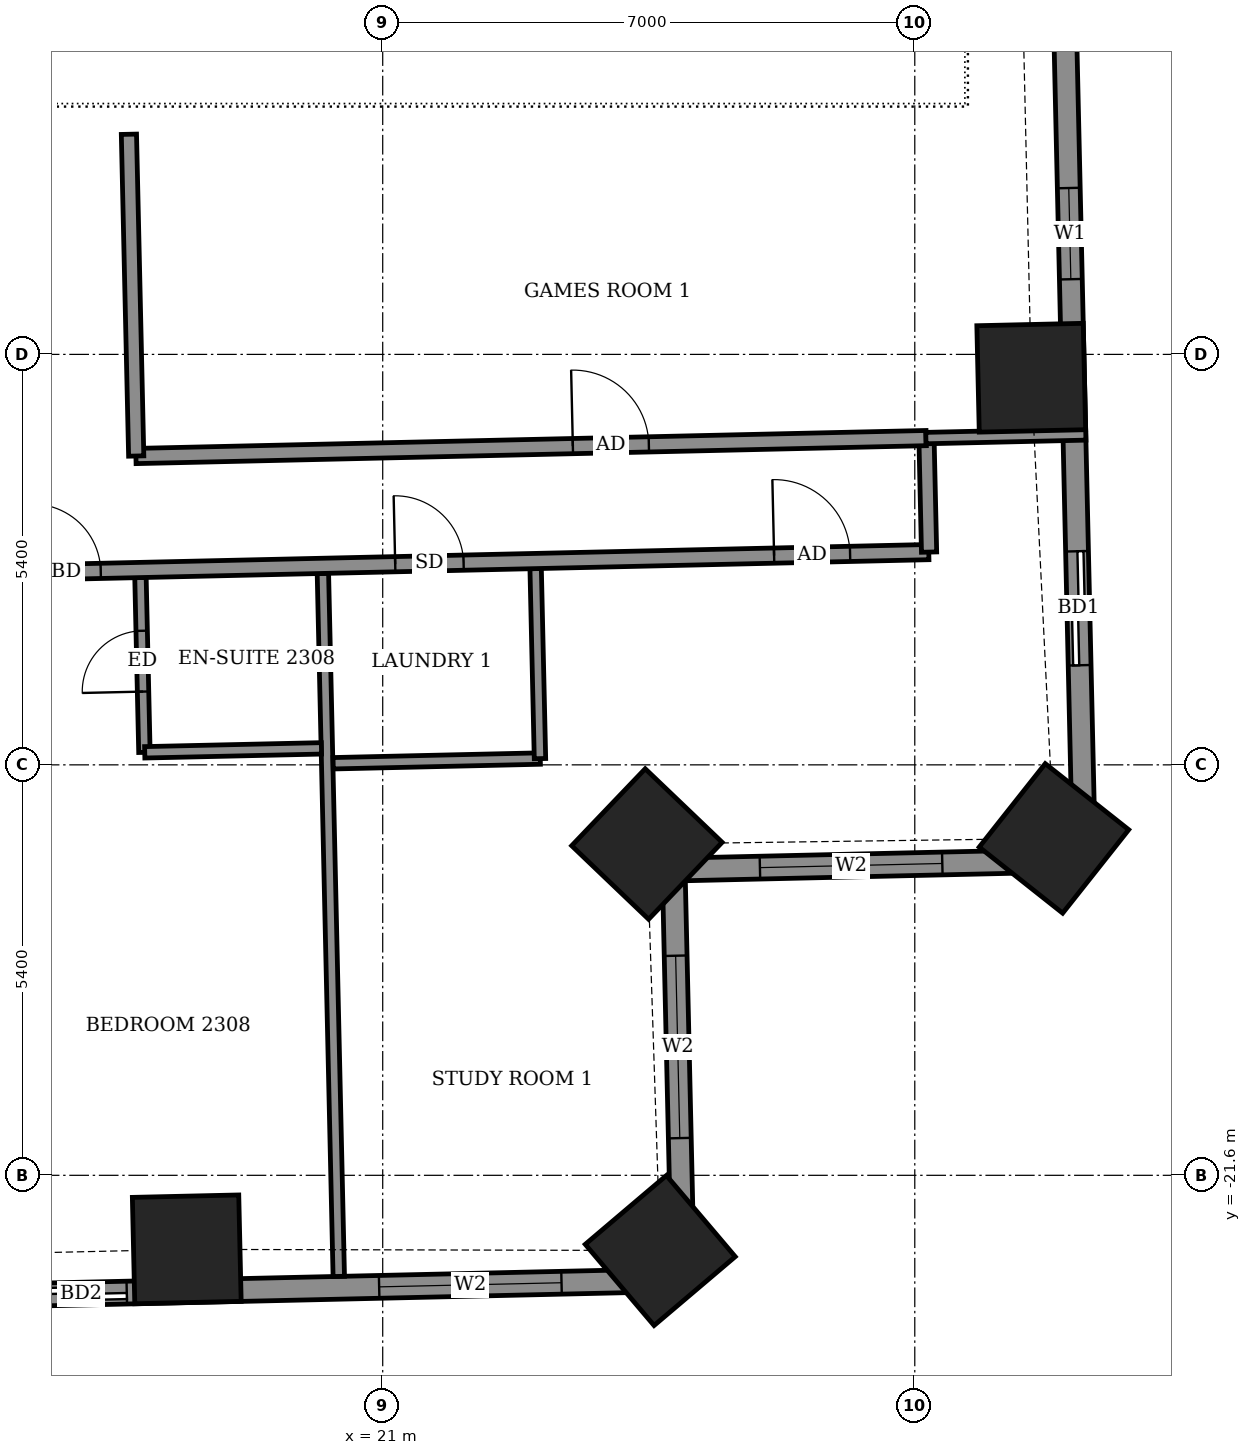
"""IFC4 building model, lengths in metres.
Left out: names, types, materials, properties, quantities, classifications, styles, units other than length and angle.
Written with IfcOpenShell. Run it as: python <this file> out.ifc"""

import sys

from ifc_helpers import new_model, si_unit, direction, frame, frame_2d, origin, origin_2d, place, context, subcontext, project, spatial, rectangle, extrude, element, fill, save


model = new_model("IFC4")
c1 = context("Model", 3, precision=1e-05, world=origin(), true_north=direction((0.0, 1.0)))
c2 = subcontext(c1, "Body", "Model", "MODEL_VIEW")
j1 = project(units=[si_unit("LENGTHUNIT", "METRE"), si_unit("PLANEANGLEUNIT", "RADIAN")], contexts=[c1])
p1 = place(None, origin())
s1 = spatial("IfcSite", under=j1, at=p1, CompositionType="ELEMENT")
p2 = place(p1, origin())
s2 = spatial("IfcBuilding", under=s1, at=p2, CompositionType="ELEMENT")
p3 = place(p2, frame((0.0, 0.0, 93.7)))
s3 = spatial("IfcBuildingStorey", under=s2, at=p3, CompositionType="ELEMENT", Elevation=93.7)
for number, where, z_axis, x_axis in (
    (1, (18.422, -22.574, -0.55), (0.0, 0.0, 1.0), (1.0, 0.023, 0.0)),
    (2, (24.651, -22.589, -0.55), (0.0, 0.0, 1.0), (0.763, 0.647, 0.0)),
    (3, (24.476, -17.241, -0.55), (0.0, 0.0, 1.0), (0.691, 0.723, 0.0)),
    (4, (29.831, -17.168, -0.55), (0.0, 0.0, 1.0), (0.621, 0.784, 0.0)),
    (5, (29.532, -11.107, -0.55), (0.0, 0.0, 1.0), (-0.023, 1.0, 0.0)),
):
    element("IfcColumn", number, at=place(p3, frame(where, z_axis=z_axis, x_axis=x_axis)), inside=s3, PredefinedType="COLUMN", context=c2, shape_type="SweptSolid", body=[
        extrude(rectangle(XDim=1.4, YDim=1.4, at=origin_2d()), origin(), (0.0, 0.0, 1.0), 3.6),
    ])
p4 = place(p3, frame((30.227, -17.455, 0.0), z_axis=(0.0, 0.0, 1.0), x_axis=(-0.022734702163, 0.999741533256, 0.0)))
e6 = element("IfcWall", 6, at=p4, inside=s3, PredefinedType="SOLIDWALL", context=c2, shape_type="SweptSolid", body=[
    extrude(rectangle(XDim=12.929, YDim=0.3, at=frame_2d((6.465, 0.0))), origin(), (0.0, 0.0, 1.0), 3.05),
])
p5 = place(p4, frame((2.566, 0.0, 0.0)))
e7 = element("IfcOpeningElement", 7, at=p5, cuts=e6, PredefinedType="OPENING", context=c2, shape_type="SweptSolid", body=[
    extrude(rectangle(XDim=1.5, YDim=2.4, at=frame_2d((0.75, 1.2))), frame((0.0, 0.16, 0.0), z_axis=(0.0, -1.0, 0.0), x_axis=(1.0, 0.0, 0.0)), (0.0, 0.0, 1.0), 0.32),
])
p6 = place(p4, frame((7.646, 0.0, 0.9)))
e8 = element("IfcOpeningElement", 8, at=p6, cuts=e6, PredefinedType="OPENING", context=c2, shape_type="SweptSolid", body=[
    extrude(rectangle(XDim=1.2, YDim=1.5, at=frame_2d((0.6, 0.75))), frame((0.0, 0.16, 0.0), z_axis=(0.0, -1.0, 0.0), x_axis=(1.0, 0.0, 0.0)), (0.0, 0.0, 1.0), 0.32),
])
p7 = place(p3, frame((-21.409, -24.029, 0.0), z_axis=(0.0, 0.0, 1.0), x_axis=(0.999742634032, 0.022686244721, 0.0)))
e9 = element("IfcWall", 9, at=p7, inside=s3, PredefinedType="SOLIDWALL", context=c2, shape_type="SweptSolid", body=[
    extrude(rectangle(XDim=46.372, YDim=0.3, at=frame_2d((23.186, 0.0))), origin(), (0.0, 0.0, 1.0), 3.05),
])
p8 = place(p7, frame((2.686, 0.0, 0.0)))
e10 = element("IfcOpeningElement", 10, at=p8, cuts=e9, PredefinedType="OPENING", context=c2, shape_type="SweptSolid", body=[
    extrude(rectangle(XDim=1.5, YDim=2.4, at=frame_2d((0.75, 1.2))), frame((0.0, 0.16, 0.0), z_axis=(0.0, -1.0, 0.0), x_axis=(1.0, 0.0, 0.0)), (0.0, 0.0, 1.0), 0.32),
])
p9 = place(p7, frame((7.959, 0.0, 0.0)))
e11 = element("IfcOpeningElement", 11, at=p9, cuts=e9, PredefinedType="OPENING", context=c2, shape_type="SweptSolid", body=[
    extrude(rectangle(XDim=1.5, YDim=2.4, at=frame_2d((0.75, 1.2))), frame((0.0, 0.16, 0.0), z_axis=(0.0, -1.0, 0.0), x_axis=(1.0, 0.0, 0.0)), (0.0, 0.0, 1.0), 0.32),
])
p10 = place(p7, frame((10.842, 0.0, 0.0)))
e12 = element("IfcOpeningElement", 12, at=p10, cuts=e9, PredefinedType="OPENING", context=c2, shape_type="SweptSolid", body=[
    extrude(rectangle(XDim=1.5, YDim=2.4, at=frame_2d((0.75, 1.2))), frame((0.0, 0.16, 0.0), z_axis=(0.0, -1.0, 0.0), x_axis=(1.0, 0.0, 0.0)), (0.0, 0.0, 1.0), 0.32),
])
p11 = place(p7, frame((16.3, 0.0, 0.0)))
e13 = element("IfcOpeningElement", 13, at=p11, cuts=e9, PredefinedType="OPENING", context=c2, shape_type="SweptSolid", body=[
    extrude(rectangle(XDim=1.5, YDim=2.4, at=frame_2d((0.75, 1.2))), frame((0.0, 0.16, 0.0), z_axis=(0.0, -1.0, 0.0), x_axis=(1.0, 0.0, 0.0)), (0.0, 0.0, 1.0), 0.32),
])
p12 = place(p7, frame((21.326, 0.0, 0.0)))
e14 = element("IfcOpeningElement", 14, at=p12, cuts=e9, PredefinedType="OPENING", context=c2, shape_type="SweptSolid", body=[
    extrude(rectangle(XDim=1.5, YDim=2.4, at=frame_2d((0.75, 1.2))), frame((0.0, 0.16, 0.0), z_axis=(0.0, -1.0, 0.0), x_axis=(1.0, 0.0, 0.0)), (0.0, 0.0, 1.0), 0.32),
])
p13 = place(p7, frame((24.21, 0.0, 0.0)))
e15 = element("IfcOpeningElement", 15, at=p13, cuts=e9, PredefinedType="OPENING", context=c2, shape_type="SweptSolid", body=[
    extrude(rectangle(XDim=1.5, YDim=2.4, at=frame_2d((0.75, 1.2))), frame((0.0, 0.16, 0.0), z_axis=(0.0, -1.0, 0.0), x_axis=(1.0, 0.0, 0.0)), (0.0, 0.0, 1.0), 0.32),
])
p14 = place(p7, frame((29.769, 0.0, 0.0)))
e16 = element("IfcOpeningElement", 16, at=p14, cuts=e9, PredefinedType="OPENING", context=c2, shape_type="SweptSolid", body=[
    extrude(rectangle(XDim=1.5, YDim=2.4, at=frame_2d((0.75, 1.2))), frame((0.0, 0.16, 0.0), z_axis=(0.0, -1.0, 0.0), x_axis=(1.0, 0.0, 0.0)), (0.0, 0.0, 1.0), 0.32),
])
p15 = place(p7, frame((34.819, 0.0, 0.0)))
e17 = element("IfcOpeningElement", 17, at=p15, cuts=e9, PredefinedType="OPENING", context=c2, shape_type="SweptSolid", body=[
    extrude(rectangle(XDim=1.5, YDim=2.4, at=frame_2d((0.75, 1.2))), frame((0.0, 0.16, 0.0), z_axis=(0.0, -1.0, 0.0), x_axis=(1.0, 0.0, 0.0)), (0.0, 0.0, 1.0), 0.32),
])
p16 = place(p7, frame((37.852, 0.0, 0.0)))
e18 = element("IfcOpeningElement", 18, at=p16, cuts=e9, PredefinedType="OPENING", context=c2, shape_type="SweptSolid", body=[
    extrude(rectangle(XDim=1.2, YDim=2.4, at=frame_2d((0.6, 1.2))), frame((0.0, 0.16, 0.0), z_axis=(0.0, -1.0, 0.0), x_axis=(1.0, 0.0, 0.0)), (0.0, 0.0, 1.0), 0.32),
])
p17 = place(p7, frame((42.373, 0.0, 0.9)))
e19 = element("IfcOpeningElement", 19, at=p17, cuts=e9, PredefinedType="OPENING", context=c2, shape_type="SweptSolid", body=[
    extrude(rectangle(XDim=2.4, YDim=1.5, at=frame_2d((1.2, 0.75))), frame((0.0, 0.16, 0.0), z_axis=(0.0, -1.0, 0.0), x_axis=(1.0, 0.0, 0.0)), (0.0, 0.0, 1.0), 0.32),
])
p18 = place(p3, frame((24.951, -22.977, 0.0), z_axis=(0.0, 0.0, 1.0), x_axis=(-0.022784045517, 0.999740409941, 0.0)))
e20 = element("IfcWall", 20, at=p18, inside=s3, PredefinedType="SOLIDWALL", context=c2, shape_type="SweptSolid", body=[
    extrude(rectangle(XDim=5.401, YDim=0.3, at=frame_2d((2.7, 0.0))), origin(), (0.0, 0.0, 1.0), 2.55),
])
p19 = place(p18, frame((1.867, 0.0, 0.9)))
e21 = element("IfcOpeningElement", 21, at=p19, cuts=e20, PredefinedType="OPENING", context=c2, shape_type="SweptSolid", body=[
    extrude(rectangle(XDim=2.4, YDim=1.5, at=frame_2d((1.2, 0.75))), frame((0.0, 0.16, 0.0), z_axis=(0.0, -1.0, 0.0), x_axis=(1.0, 0.0, 0.0)), (0.0, 0.0, 1.0), 0.32),
])
p20 = place(p3, frame((24.828, -17.578, 0.0), z_axis=(0.0, 0.0, 1.0), x_axis=(0.99974143864, 0.022738862475, 0.0)))
e22 = element("IfcWall", 22, at=p20, inside=s3, PredefinedType="SOLIDWALL", context=c2, shape_type="SweptSolid", body=[
    extrude(rectangle(XDim=5.401, YDim=0.3, at=frame_2d((2.7, 0.0))), origin(), (0.0, 0.0, 1.0), 2.55),
])
p21 = place(p20, frame((1.135, 0.0, 0.9)))
e23 = element("IfcOpeningElement", 23, at=p21, cuts=e22, PredefinedType="OPENING", context=c2, shape_type="SweptSolid", body=[
    extrude(rectangle(XDim=2.4, YDim=1.5, at=frame_2d((1.2, 0.75))), frame((0.0, 0.16, 0.0), z_axis=(0.0, -1.0, 0.0), x_axis=(1.0, 0.0, 0.0)), (0.0, 0.0, 1.0), 0.32),
])
p22 = place(p3, frame((20.422, -22.93, 0.0), z_axis=(0.0, 0.0, 1.0), x_axis=(-0.022618288198, 0.999744173796, 0.0)))
e24 = element("IfcWall", 24, at=p22, inside=s3, PredefinedType="PARTITIONING", context=c2, shape_type="SweptSolid", body=[
    extrude(rectangle(XDim=9.25, YDim=0.15, at=frame_2d((4.625, 0.0))), origin(), (0.0, 0.0, 1.0), 2.55),
])
p23 = place(p3, frame((20.348, -16.179, 0.0), z_axis=(0.0, 0.0, 1.0), x_axis=(0.999741187782, 0.022749889061, 0.0)))
e25 = element("IfcWall", 25, at=p23, inside=s3, PredefinedType="PARTITIONING", context=c2, shape_type="SweptSolid", body=[
    extrude(rectangle(XDim=2.726, YDim=0.15, at=frame_2d((1.363, 0.0))), origin(), (0.0, 0.0, 1.0), 3.05),
])
p24 = place(p3, frame((23.069, -16.118, 0.0), z_axis=(0.0, 0.0, 1.0), x_axis=(-0.022845598362, 0.999739005259, 0.0)))
e26 = element("IfcWall", 26, at=p24, inside=s3, PredefinedType="PARTITIONING", context=c2, shape_type="SweptSolid", body=[
    extrude(rectangle(XDim=2.501, YDim=0.15, at=frame_2d((1.25, 0.0))), origin(), (0.0, 0.0, 1.0), 3.05),
])
p25 = place(p3, frame((17.865, -16.036, 0.0), z_axis=(0.0, 0.0, 1.0), x_axis=(-0.022605686808, 0.999744458811, 0.0)))
e27 = element("IfcWall", 27, at=p25, inside=s3, PredefinedType="PARTITIONING", context=c2, shape_type="SweptSolid", body=[
    extrude(rectangle(XDim=2.3, YDim=0.15, at=frame_2d((1.15, 0.0))), origin(), (0.0, 0.0, 1.0), 3.05),
])
p26 = place(p25, frame((0.8, 0.0, 0.0)))
e28 = element("IfcOpeningElement", 28, at=p26, cuts=e27, PredefinedType="OPENING", context=c2, shape_type="SweptSolid", body=[
    extrude(rectangle(XDim=0.8, YDim=2.1, at=frame_2d((0.4, 1.05))), frame((0.0, 0.085, 0.0), z_axis=(0.0, -1.0, 0.0), x_axis=(1.0, 0.0, 0.0)), (0.0, 0.0, 1.0), 0.17),
])
p27 = place(p3, frame((17.869, -16.035, 0.0), z_axis=(0.0, 0.0, 1.0), x_axis=(0.999750007167, 0.022358961731, 0.0)))
e29 = element("IfcWall", 29, at=p27, inside=s3, PredefinedType="PARTITIONING", context=c2, shape_type="SweptSolid", body=[
    extrude(rectangle(XDim=2.326, YDim=0.15, at=frame_2d((1.163, 0.0))), origin(), (0.0, 0.0, 1.0), 3.05),
])
p28 = place(p3, frame((-24.274, -14.591, 0.0), z_axis=(0.0, 0.0, 1.0), x_axis=(0.999742718753, 0.022682510909, 0.0)))
e30 = element("IfcWall", 30, at=p28, inside=s3, PredefinedType="PARTITIONING", context=c2, shape_type="SweptSolid", body=[
    extrude(rectangle(XDim=52.471, YDim=0.2, at=frame_2d((26.236, 0.0))), origin(), (0.0, 0.0, 1.0), 3.05),
])
p29 = place(p28, frame((1.525, 0.0, 0.0)))
e31 = element("IfcOpeningElement", 31, at=p29, cuts=e30, PredefinedType="OPENING", context=c2, shape_type="SweptSolid", body=[
    extrude(rectangle(XDim=1.0, YDim=2.1, at=frame_2d((0.5, 1.05))), frame((0.0, 0.11, 0.0), z_axis=(0.0, -1.0, 0.0), x_axis=(1.0, 0.0, 0.0)), (0.0, 0.0, 1.0), 0.22),
])
p30 = place(p28, frame((6.9, 0.0, 0.0)))
e32 = element("IfcOpeningElement", 32, at=p30, cuts=e30, PredefinedType="OPENING", context=c2, shape_type="SweptSolid", body=[
    extrude(rectangle(XDim=0.9, YDim=2.1, at=frame_2d((0.45, 1.05))), frame((0.0, 0.11, 0.0), z_axis=(0.0, -1.0, 0.0), x_axis=(1.0, 0.0, 0.0)), (0.0, 0.0, 1.0), 0.22),
])
p31 = place(p28, frame((11.575, 0.0, 0.0)))
e33 = element("IfcOpeningElement", 33, at=p31, cuts=e30, PredefinedType="OPENING", context=c2, shape_type="SweptSolid", body=[
    extrude(rectangle(XDim=0.9, YDim=2.1, at=frame_2d((0.45, 1.05))), frame((0.0, 0.11, 0.0), z_axis=(0.0, -1.0, 0.0), x_axis=(1.0, 0.0, 0.0)), (0.0, 0.0, 1.0), 0.22),
])
p32 = place(p28, frame((13.6, 0.0, 0.0)))
e34 = element("IfcOpeningElement", 34, at=p32, cuts=e30, PredefinedType="OPENING", context=c2, shape_type="SweptSolid", body=[
    extrude(rectangle(XDim=0.9, YDim=2.1, at=frame_2d((0.45, 1.05))), frame((0.0, 0.11, 0.0), z_axis=(0.0, -1.0, 0.0), x_axis=(1.0, 0.0, 0.0)), (0.0, 0.0, 1.0), 0.22),
])
p33 = place(p28, frame((20.45, 0.0, 0.0)))
e35 = element("IfcOpeningElement", 35, at=p33, cuts=e30, PredefinedType="OPENING", context=c2, shape_type="SweptSolid", body=[
    extrude(rectangle(XDim=0.9, YDim=2.1, at=frame_2d((0.45, 1.05))), frame((0.0, 0.11, 0.0), z_axis=(0.0, -1.0, 0.0), x_axis=(1.0, 0.0, 0.0)), (0.0, 0.0, 1.0), 0.22),
])
p34 = place(p28, frame((22.6, 0.0, 0.0)))
e36 = element("IfcOpeningElement", 36, at=p34, cuts=e30, PredefinedType="OPENING", context=c2, shape_type="SweptSolid", body=[
    extrude(rectangle(XDim=0.9, YDim=2.1, at=frame_2d((0.45, 1.05))), frame((0.0, 0.11, 0.0), z_axis=(0.0, -1.0, 0.0), x_axis=(1.0, 0.0, 0.0)), (0.0, 0.0, 1.0), 0.22),
])
p35 = place(p28, frame((29.475, 0.0, 0.0)))
e37 = element("IfcOpeningElement", 37, at=p35, cuts=e30, PredefinedType="OPENING", context=c2, shape_type="SweptSolid", body=[
    extrude(rectangle(XDim=0.9, YDim=2.1, at=frame_2d((0.45, 1.05))), frame((0.0, 0.11, 0.0), z_axis=(0.0, -1.0, 0.0), x_axis=(1.0, 0.0, 0.0)), (0.0, 0.0, 1.0), 0.22),
])
p36 = place(p28, frame((31.675, 0.0, 0.0)))
e38 = element("IfcOpeningElement", 38, at=p36, cuts=e30, PredefinedType="OPENING", context=c2, shape_type="SweptSolid", body=[
    extrude(rectangle(XDim=0.9, YDim=2.1, at=frame_2d((0.45, 1.05))), frame((0.0, 0.11, 0.0), z_axis=(0.0, -1.0, 0.0), x_axis=(1.0, 0.0, 0.0)), (0.0, 0.0, 1.0), 0.22),
])
p37 = place(p28, frame((38.675, 0.0, 0.0)))
e39 = element("IfcOpeningElement", 39, at=p37, cuts=e30, PredefinedType="OPENING", context=c2, shape_type="SweptSolid", body=[
    extrude(rectangle(XDim=0.9, YDim=2.1, at=frame_2d((0.45, 1.05))), frame((0.0, 0.11, 0.0), z_axis=(0.0, -1.0, 0.0), x_axis=(1.0, 0.0, 0.0)), (0.0, 0.0, 1.0), 0.22),
])
p38 = place(p28, frame((40.675, 0.0, 0.0)))
e40 = element("IfcOpeningElement", 40, at=p38, cuts=e30, PredefinedType="OPENING", context=c2, shape_type="SweptSolid", body=[
    extrude(rectangle(XDim=0.9, YDim=2.1, at=frame_2d((0.45, 1.05))), frame((0.0, 0.11, 0.0), z_axis=(0.0, -1.0, 0.0), x_axis=(1.0, 0.0, 0.0)), (0.0, 0.0, 1.0), 0.22),
])
p39 = place(p28, frame((50.436, 0.0, 0.0)))
e41 = element("IfcOpeningElement", 41, at=p39, cuts=e30, PredefinedType="OPENING", context=c2, shape_type="SweptSolid", body=[
    extrude(rectangle(XDim=1.0, YDim=2.1, at=frame_2d((0.5, 1.05))), frame((0.0, 0.11, 0.0), z_axis=(0.0, -1.0, 0.0), x_axis=(1.0, 0.0, 0.0)), (0.0, 0.0, 1.0), 0.22),
])
p40 = place(p28, frame((45.45, 0.0, 0.0)))
e42 = element("IfcOpeningElement", 42, at=p40, cuts=e30, PredefinedType="OPENING", context=c2, shape_type="SweptSolid", body=[
    extrude(rectangle(XDim=0.9, YDim=2.1, at=frame_2d((0.45, 1.05))), frame((0.0, 0.11, 0.0), z_axis=(0.0, -1.0, 0.0), x_axis=(1.0, 0.0, 0.0)), (0.0, 0.0, 1.0), 0.22),
])
p41 = place(p3, frame((28.188, -13.401, 0.0), z_axis=(0.0, 0.0, 1.0), x_axis=(-0.022617910375, 0.999744182344, 0.0)))
e43 = element("IfcWall", 43, at=p41, inside=s3, PredefinedType="PARTITIONING", context=c2, shape_type="SweptSolid", body=[
    extrude(rectangle(XDim=1.5, YDim=0.2, at=frame_2d((0.75, 0.0))), origin(), (0.0, 0.0, 1.0), 3.05),
])
p42 = place(p3, frame((17.753, -12.137, 0.0), z_axis=(0.0, 0.0, 1.0), x_axis=(0.999742295888, 0.022701141223, 0.0)))
e44 = element("IfcWall", 44, at=p42, inside=s3, PredefinedType="PARTITIONING", context=c2, shape_type="SweptSolid", body=[
    extrude(rectangle(XDim=10.4, YDim=0.2, at=frame_2d((5.2, 0.0))), origin(), (0.0, 0.0, 1.0), 3.05),
])
p43 = place(p42, frame((5.75, 0.0, 0.0)))
e45 = element("IfcOpeningElement", 45, at=p43, cuts=e44, PredefinedType="OPENING", context=c2, shape_type="SweptSolid", body=[
    extrude(rectangle(XDim=1.0, YDim=2.1, at=frame_2d((0.5, 1.05))), frame((0.0, 0.11, 0.0), z_axis=(0.0, -1.0, 0.0), x_axis=(1.0, 0.0, 0.0)), (0.0, 0.0, 1.0), 0.22),
])
p44 = place(p3, frame((17.757, -12.137, 0.0), z_axis=(0.0, 0.0, 1.0), x_axis=(-0.022718785711, 0.999741895079, 0.0)))
e46 = element("IfcWall", 46, at=p44, inside=s3, PredefinedType="PARTITIONING", context=c2, shape_type="SweptSolid", body=[
    extrude(rectangle(XDim=4.234, YDim=0.2, at=frame_2d((2.117, 0.0))), origin(), (0.0, 0.0, 1.0), 3.05),
])
p45 = place(p3, frame((28.146, -11.901, 0.0), z_axis=(0.0, 0.0, 1.0), x_axis=(0.999741476082, 0.022737216212, 0.0)))
e47 = element("IfcWall", 47, at=p45, inside=s3, PredefinedType="PARTITIONING", context=c2, shape_type="SweptSolid", body=[
    extrude(rectangle(XDim=2.104, YDim=0.15, at=frame_2d((1.052, 0.0))), origin(), (0.0, 0.0, 1.0), 2.55),
])
p46 = place(p5, origin())
e48 = element("IfcDoor", 48, at=p46, inside=s3, OperationType="SLIDING_TO_LEFT", PredefinedType="DOOR", context=c2, shape_type="SweptSolid", body=[
    extrude(rectangle(XDim=1.5, YDim=2.4, at=frame_2d((0.75, 1.2))), frame((0.0, 0.025, 0.0), z_axis=(0.0, -1.0, 0.0), x_axis=(1.0, 0.0, 0.0)), (0.0, 0.0, 1.0), 0.05),
])
fill(e7, e48)
p47 = place(p6, origin())
e49 = element("IfcWindow", 49, at=p47, inside=s3, PartitioningType="SINGLE_PANEL", PredefinedType="WINDOW", context=c2, shape_type="SweptSolid", body=[
    extrude(rectangle(XDim=1.2, YDim=1.5, at=frame_2d((0.6, 0.75))), frame((0.0, 0.03, 0.0), z_axis=(0.0, -1.0, 0.0), x_axis=(1.0, 0.0, 0.0)), (0.0, 0.0, 1.0), 0.06),
])
fill(e8, e49)
p48 = place(p16, origin())
e50 = element("IfcDoor", 50, at=p48, inside=s3, OperationType="SLIDING_TO_LEFT", PredefinedType="DOOR", context=c2, shape_type="SweptSolid", body=[
    extrude(rectangle(XDim=1.2, YDim=2.4, at=frame_2d((0.6, 1.2))), frame((0.0, 0.025, 0.0), z_axis=(0.0, -1.0, 0.0), x_axis=(1.0, 0.0, 0.0)), (0.0, 0.0, 1.0), 0.05),
])
fill(e18, e50)
p49 = place(p17, origin())
e51 = element("IfcWindow", 51, at=p49, inside=s3, PartitioningType="DOUBLE_PANEL_VERTICAL", PredefinedType="WINDOW", context=c2, shape_type="SweptSolid", body=[
    extrude(rectangle(XDim=2.4, YDim=1.5, at=frame_2d((1.2, 0.75))), frame((0.0, 0.03, 0.0), z_axis=(0.0, -1.0, 0.0), x_axis=(1.0, 0.0, 0.0)), (0.0, 0.0, 1.0), 0.06),
])
fill(e19, e51)
p50 = place(p19, origin())
e52 = element("IfcWindow", 52, at=p50, inside=s3, PartitioningType="DOUBLE_PANEL_VERTICAL", PredefinedType="WINDOW", context=c2, shape_type="SweptSolid", body=[
    extrude(rectangle(XDim=2.4, YDim=1.5, at=frame_2d((1.2, 0.75))), frame((0.0, 0.03, 0.0), z_axis=(0.0, -1.0, 0.0), x_axis=(1.0, 0.0, 0.0)), (0.0, 0.0, 1.0), 0.06),
])
fill(e21, e52)
p51 = place(p21, origin())
e53 = element("IfcWindow", 53, at=p51, inside=s3, PartitioningType="DOUBLE_PANEL_VERTICAL", PredefinedType="WINDOW", context=c2, shape_type="SweptSolid", body=[
    extrude(rectangle(XDim=2.4, YDim=1.5, at=frame_2d((1.2, 0.75))), frame((0.0, 0.03, 0.0), z_axis=(0.0, -1.0, 0.0), x_axis=(1.0, 0.0, 0.0)), (0.0, 0.0, 1.0), 0.06),
])
fill(e23, e53)
p52 = place(p38, origin())
e54 = element("IfcDoor", 54, at=p52, inside=s3, OperationType="SINGLE_SWING_RIGHT", PredefinedType="DOOR", context=c2, shape_type="SweptSolid", body=[
    extrude(rectangle(XDim=0.9, YDim=2.1, at=frame_2d((0.45, 1.05))), frame((0.0, 0.025, 0.0), z_axis=(0.0, -1.0, 0.0), x_axis=(1.0, 0.0, 0.0)), (0.0, 0.0, 1.0), 0.05),
])
fill(e40, e54)
p53 = place(p26, origin())
e55 = element("IfcDoor", 55, at=p53, inside=s3, OperationType="SINGLE_SWING_RIGHT", PredefinedType="DOOR", context=c2, shape_type="SweptSolid", body=[
    extrude(rectangle(XDim=0.8, YDim=2.1, at=frame_2d((0.4, 1.05))), frame((0.0, 0.025, 0.0), z_axis=(0.0, -1.0, 0.0), x_axis=(1.0, 0.0, 0.0)), (0.0, 0.0, 1.0), 0.05),
])
fill(e28, e55)
p54 = place(p39, origin())
e56 = element("IfcDoor", 56, at=p54, inside=s3, OperationType="SINGLE_SWING_RIGHT", PredefinedType="DOOR", context=c2, shape_type="SweptSolid", body=[
    extrude(rectangle(XDim=1.0, YDim=2.1, at=frame_2d((0.5, 1.05))), frame((0.0, 0.025, 0.0), z_axis=(0.0, -1.0, 0.0), x_axis=(1.0, 0.0, 0.0)), (0.0, 0.0, 1.0), 0.05),
])
fill(e41, e56)
p55 = place(p40, origin())
e57 = element("IfcDoor", 57, at=p55, inside=s3, OperationType="SINGLE_SWING_RIGHT", PredefinedType="DOOR", context=c2, shape_type="SweptSolid", body=[
    extrude(rectangle(XDim=0.9, YDim=2.1, at=frame_2d((0.45, 1.05))), frame((0.0, 0.025, 0.0), z_axis=(0.0, -1.0, 0.0), x_axis=(1.0, 0.0, 0.0)), (0.0, 0.0, 1.0), 0.05),
])
fill(e42, e57)
p56 = place(p43, origin())
e58 = element("IfcDoor", 58, at=p56, inside=s3, OperationType="SINGLE_SWING_LEFT", PredefinedType="DOOR", context=c2, shape_type="SweptSolid", body=[
    extrude(rectangle(XDim=1.0, YDim=2.1, at=frame_2d((0.5, 1.05))), frame((0.0, 0.025, 0.0), z_axis=(0.0, -1.0, 0.0), x_axis=(1.0, 0.0, 0.0)), (0.0, 0.0, 1.0), 0.05),
])
fill(e45, e58)
save(model, sys.argv[1])
